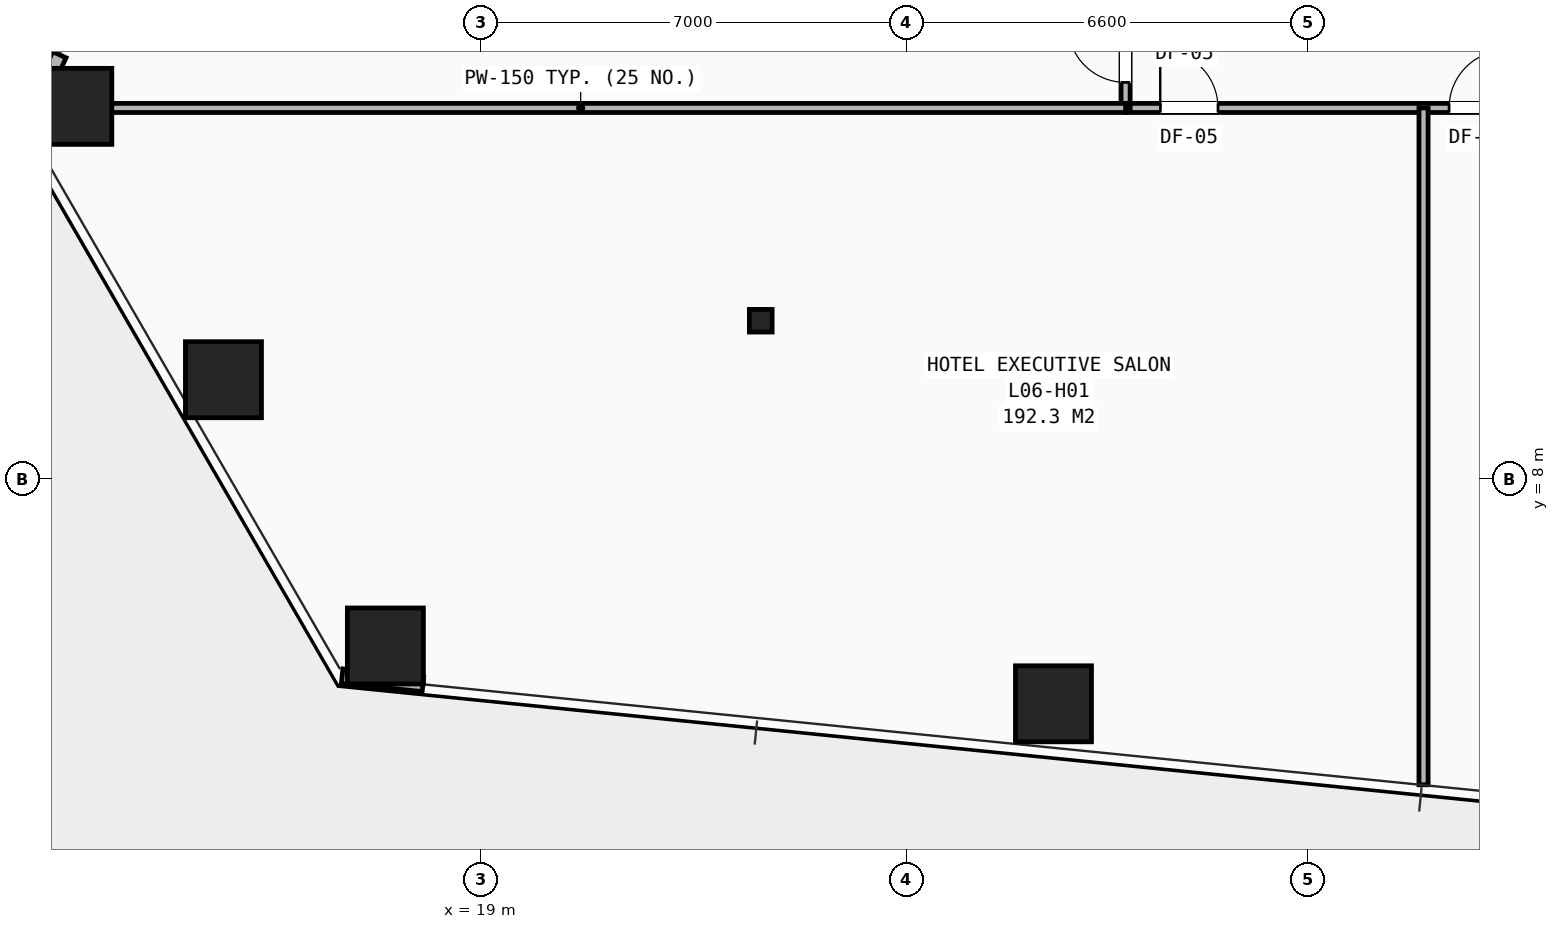
"""IFC4 building model, lengths in metres.
Left out: names, types, materials, properties, quantities, classifications, styles, units other than length and angle.
Written with IfcOpenShell. Run it as: python <this file> out.ifc"""

import sys

from ifc_helpers import new_model, si_unit, direction, frame, frame_2d, origin, origin_2d, place, context, subcontext, project, spatial, rectangle, hollow_rectangle, i_section, extrude, element, fill, save


model = new_model("IFC4")
c1 = context("Model", 3, precision=1e-05, world=origin(), true_north=direction((0.0, 1.0)))
c2 = subcontext(c1, "Body", "Model", "MODEL_VIEW")
j1 = project(units=[si_unit("LENGTHUNIT", "METRE"), si_unit("PLANEANGLEUNIT", "RADIAN")], contexts=[c1])
p1 = place(None, origin())
s1 = spatial("IfcSite", under=j1, at=p1, CompositionType="ELEMENT")
p2 = place(p1, origin())
s2 = spatial("IfcBuilding", under=s1, at=p2, CompositionType="ELEMENT")
p3 = place(p2, frame((0.0, 0.0, 27.2)))
s3 = spatial("IfcBuildingStorey", under=s2, at=p3, CompositionType="ELEMENT", Elevation=27.2)
p4 = place(p3, frame((23.6, 10.6, 0.0), z_axis=(0.0, 0.0, 1.0), x_axis=(1.0, 0.0, 0.0)))
e1 = element("IfcColumn", 1, at=p4, inside=s3, PredefinedType="COLUMN", context=c2, shape_type="SweptSolid", body=[
    extrude(i_section(OverallWidth=0.374, OverallDepth=0.372, WebThickness=0.016, FlangeThickness=0.026, at=origin_2d()), origin(), (0.0, 0.0, 1.0), 3.2),
])
for number, where, z_axis, x_axis in (
    (2, (12.303, 14.126, 0.0), (0.0, 0.0, 1.0), (1.0, 0.0, 0.0)),
    (3, (14.764, 9.63, 0.0), (0.0, 0.0, 1.0), (1.0, 0.0, 0.0)),
    (4, (17.427, 5.251, 0.0), (0.0, 0.0, 1.0), (1.0, 0.0, 0.0)),
    (5, (28.414, 4.3, 0.0), (0.0, 0.0, 1.0), (1.0, 0.0, 0.0)),
):
    element("IfcColumn", number, at=place(p3, frame(where, z_axis=z_axis, x_axis=x_axis)), inside=s3, PredefinedType="COLUMN", context=c2, shape_type="SweptSolid", body=[
        extrude(hollow_rectangle(XDim=1.25, YDim=1.25, WallThickness=0.08, at=origin_2d()), origin(), (0.0, 0.0, 1.0), 3.2),
    ])
p5 = place(p3, frame((12.065, 14.975, 0.0), z_axis=(0.0, 0.0, 1.0), x_axis=(-0.410767856127, -0.91173996752, 0.0)))
e6 = element("IfcWall", 6, at=p5, inside=s3, PredefinedType="SHEAR", context=c2, shape_type="SweptSolid", body=[
    extrude(rectangle(XDim=1.334, YDim=0.24, at=frame_2d((0.667, 0.0))), origin(), (0.0, 0.0, 1.0), 2.263),
])
p6 = place(p3, frame((16.716, 4.754, 0.0), z_axis=(0.0, 0.0, 1.0), x_axis=(0.994962653924, -0.100246283205, 0.0)))
e7 = element("IfcWall", 7, at=p6, inside=s3, PredefinedType="SHEAR", context=c2, shape_type="SweptSolid", body=[
    extrude(rectangle(XDim=1.335, YDim=0.24, at=frame_2d((0.667, 0.0))), origin(), (0.0, 0.0, 1.0), 2.263),
])
p7 = place(p3, frame((29.6, 14.1, 0.0), z_axis=(0.0, 0.0, 1.0), x_axis=(1.0, 0.0, 0.0)))
e8 = element("IfcWall", 8, at=p7, inside=s3, PredefinedType="PARTITIONING", context=c2, shape_type="SweptSolid", body=[
    extrude(rectangle(XDim=20.8, YDim=0.15, at=frame_2d((10.4, 0.0))), origin(), (0.0, 0.0, 1.0), 2.431),
])
p8 = place(p7, frame((0.57, 0.0, 0.0)))
e9 = element("IfcOpeningElement", 9, at=p8, cuts=e8, PredefinedType="OPENING", context=c2, shape_type="SweptSolid", body=[
    extrude(rectangle(XDim=0.95, YDim=2.1, at=frame_2d((0.475, 1.05))), frame((0.0, 0.085, 0.0), z_axis=(0.0, -1.0, 0.0), x_axis=(1.0, 0.0, 0.0)), (0.0, 0.0, 1.0), 0.17),
])
p9 = place(p7, frame((5.32, 0.0, 0.0)))
e10 = element("IfcOpeningElement", 10, at=p9, cuts=e8, PredefinedType="OPENING", context=c2, shape_type="SweptSolid", body=[
    extrude(rectangle(XDim=0.95, YDim=2.1, at=frame_2d((0.475, 1.05))), frame((0.0, 0.085, 0.0), z_axis=(0.0, -1.0, 0.0), x_axis=(1.0, 0.0, 0.0)), (0.0, 0.0, 1.0), 0.17),
])
p10 = place(p7, frame((13.32, 0.0, 0.0)))
e11 = element("IfcOpeningElement", 11, at=p10, cuts=e8, PredefinedType="OPENING", context=c2, shape_type="SweptSolid", body=[
    extrude(rectangle(XDim=0.95, YDim=2.1, at=frame_2d((0.475, 1.05))), frame((0.0, 0.085, 0.0), z_axis=(0.0, -1.0, 0.0), x_axis=(1.0, 0.0, 0.0)), (0.0, 0.0, 1.0), 0.17),
])
p11 = place(p3, frame((29.6, 14.1, 0.0), z_axis=(0.0, 0.0, 1.0), x_axis=(0.0, 1.0, 0.0)))
e12 = element("IfcWall", 12, at=p11, inside=s3, PredefinedType="PARTITIONING", context=c2, shape_type="SweptSolid", body=[
    extrude(rectangle(XDim=21.9, YDim=0.15, at=frame_2d((10.95, 0.0))), origin(), (0.0, 0.0, 1.0), 2.431),
])
p12 = place(p11, frame((0.42, 0.0, 0.0)))
e13 = element("IfcOpeningElement", 13, at=p12, cuts=e12, PredefinedType="OPENING", context=c2, shape_type="SweptSolid", body=[
    extrude(rectangle(XDim=0.95, YDim=2.1, at=frame_2d((0.475, 1.05))), frame((0.0, 0.085, 0.0), z_axis=(0.0, -1.0, 0.0), x_axis=(1.0, 0.0, 0.0)), (0.0, 0.0, 1.0), 0.17),
])
p13 = place(p11, frame((6.82, 0.0, 0.0)))
e14 = element("IfcOpeningElement", 14, at=p13, cuts=e12, PredefinedType="OPENING", context=c2, shape_type="SweptSolid", body=[
    extrude(rectangle(XDim=0.95, YDim=2.1, at=frame_2d((0.475, 1.05))), frame((0.0, 0.085, 0.0), z_axis=(0.0, -1.0, 0.0), x_axis=(1.0, 0.0, 0.0)), (0.0, 0.0, 1.0), 0.17),
])
p14 = place(p11, frame((14.32, 0.0, 0.0)))
e15 = element("IfcOpeningElement", 15, at=p14, cuts=e12, PredefinedType="OPENING", context=c2, shape_type="SweptSolid", body=[
    extrude(rectangle(XDim=0.95, YDim=2.1, at=frame_2d((0.475, 1.05))), frame((0.0, 0.085, 0.0), z_axis=(0.0, -1.0, 0.0), x_axis=(1.0, 0.0, 0.0)), (0.0, 0.0, 1.0), 0.17),
])
p15 = place(p3, frame((34.5, 2.968, 0.0), z_axis=(0.0, 0.0, 1.0), x_axis=(0.0, 1.0, 0.0)))
e16 = element("IfcWall", 16, at=p15, inside=s3, PredefinedType="PARTITIONING", context=c2, shape_type="SweptSolid", body=[
    extrude(rectangle(XDim=11.132, YDim=0.15, at=frame_2d((5.566, 0.0))), origin(), (0.0, 0.0, 1.0), 2.268),
])
p16 = place(p3, frame((11.677, 14.1, 0.0), z_axis=(0.0, 0.0, 1.0), x_axis=(1.0, 0.0, 0.0)))
e17 = element("IfcWall", 17, at=p16, inside=s3, PredefinedType="PARTITIONING", context=c2, shape_type="SweptSolid", body=[
    extrude(rectangle(XDim=17.923, YDim=0.15, at=frame_2d((8.961, 0.0))), origin(), (0.0, 0.0, 1.0), 2.268),
])
p17 = place(p8, origin())
e18 = element("IfcDoor", 18, at=p17, inside=s3, OperationType="SINGLE_SWING_LEFT", PredefinedType="DOOR", context=c2, shape_type="SweptSolid", body=[
    extrude(rectangle(XDim=0.95, YDim=2.1, at=frame_2d((0.475, 1.05))), frame((0.0, 0.025, 0.0), z_axis=(0.0, -1.0, 0.0), x_axis=(1.0, 0.0, 0.0)), (0.0, 0.0, 1.0), 0.05),
])
fill(e9, e18)
p18 = place(p9, origin())
e19 = element("IfcDoor", 19, at=p18, inside=s3, OperationType="SINGLE_SWING_RIGHT", PredefinedType="DOOR", context=c2, shape_type="SweptSolid", body=[
    extrude(rectangle(XDim=0.95, YDim=2.1, at=frame_2d((0.475, 1.05))), frame((0.0, 0.025, 0.0), z_axis=(0.0, -1.0, 0.0), x_axis=(1.0, 0.0, 0.0)), (0.0, 0.0, 1.0), 0.05),
])
fill(e10, e19)
p19 = place(p12, origin())
e20 = element("IfcDoor", 20, at=p19, inside=s3, OperationType="SINGLE_SWING_RIGHT", PredefinedType="DOOR", context=c2, shape_type="SweptSolid", body=[
    extrude(rectangle(XDim=0.95, YDim=2.1, at=frame_2d((0.475, 1.05))), frame((0.0, 0.025, 0.0), z_axis=(0.0, -1.0, 0.0), x_axis=(1.0, 0.0, 0.0)), (0.0, 0.0, 1.0), 0.05),
])
fill(e13, e20)
save(model, sys.argv[1])
